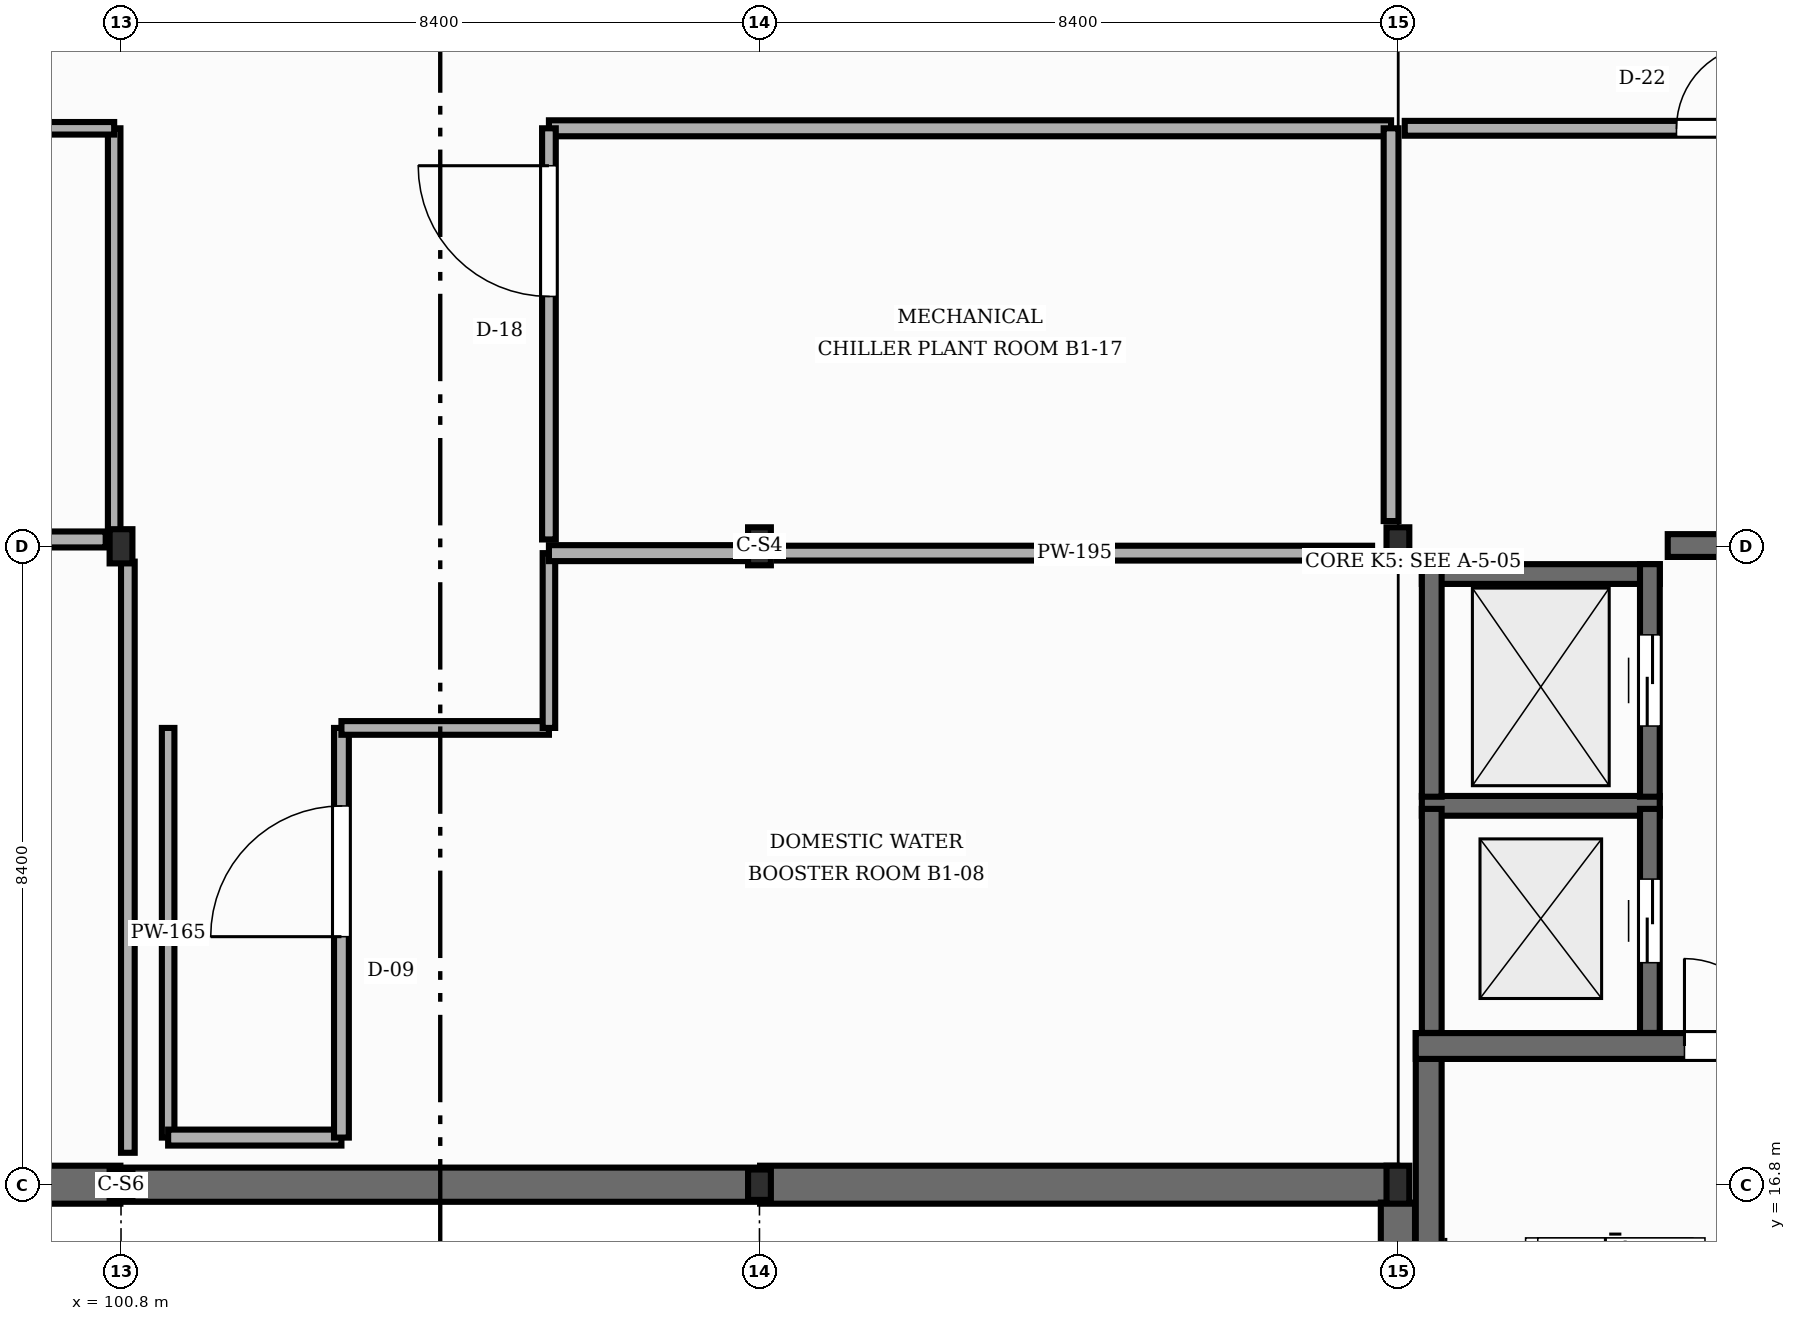
"""IFC4 building model, lengths in metres.
Left out: names, types, materials, properties, quantities, classifications, styles, units other than length and angle.
Written with IfcOpenShell. Run it as: python <this file> out.ifc"""

import sys

from ifc_helpers import new_model, si_unit, direction, frame, frame_2d, origin, origin_2d, place, context, subcontext, project, spatial, rectangle, i_section, extrude, element, fill, save


model = new_model("IFC4")
c1 = context("Model", 3, precision=1e-05, world=origin(), true_north=direction((0.0, 1.0)))
c2 = subcontext(c1, "Body", "Model", "MODEL_VIEW")
j1 = project(units=[si_unit("LENGTHUNIT", "METRE"), si_unit("PLANEANGLEUNIT", "RADIAN")], contexts=[c1])
p1 = place(None, origin())
s1 = spatial("IfcSite", under=j1, at=p1, CompositionType="ELEMENT")
p2 = place(p1, origin())
s2 = spatial("IfcBuilding", under=s1, at=p2, CompositionType="ELEMENT")
p3 = place(p2, frame((0.0, 0.0, -4.5)))
s3 = spatial("IfcBuildingStorey", under=s2, at=p3, CompositionType="ELEMENT", Elevation=-4.5)
p4 = place(p3, frame((100.8, 16.8, 0.0), z_axis=(0.0, 0.0, 1.0), x_axis=(1.0, 0.0, 0.0)))
e1 = element("IfcColumn", 1, at=p4, inside=s3, PredefinedType="COLUMN", context=c2, shape_type="SweptSolid", body=[
    extrude(i_section(OverallWidth=0.3, OverallDepth=0.4, WebThickness=0.013, FlangeThickness=0.024, FilletRadius=0.027, at=origin_2d()), origin(), (0.0, 0.0, 1.0), 4.5),
])
p5 = place(p3, frame((100.8, 25.2, 0.0), z_axis=(0.0, 0.0, 1.0), x_axis=(1.0, 0.0, 0.0)))
e2 = element("IfcColumn", 2, at=p5, inside=s3, PredefinedType="COLUMN", context=c2, shape_type="SweptSolid", body=[
    extrude(i_section(OverallWidth=0.3, OverallDepth=0.45, WebThickness=0.014, FlangeThickness=0.026, FilletRadius=0.027, at=origin_2d()), origin(), (0.0, 0.0, 1.0), 4.5),
])
p6 = place(p3, frame((109.2, 16.8, 0.0), z_axis=(0.0, 0.0, 1.0), x_axis=(1.0, 0.0, 0.0)))
e3 = element("IfcColumn", 3, at=p6, inside=s3, PredefinedType="COLUMN", context=c2, shape_type="SweptSolid", body=[
    extrude(i_section(OverallWidth=0.3, OverallDepth=0.4, WebThickness=0.013, FlangeThickness=0.024, FilletRadius=0.027, at=origin_2d()), origin(), (0.0, 0.0, 1.0), 4.5),
])
for number, where, z_axis, x_axis in (
    (4, (109.2, 25.2, 0.0), (0.0, 0.0, 1.0), (1.0, 0.0, 0.0)),
    (5, (117.6, 16.8, 0.0), (0.0, 0.0, 1.0), (1.0, 0.0, 0.0)),
    (6, (117.6, 25.2, 0.0), (0.0, 0.0, 1.0), (1.0, 0.0, 0.0)),
):
    element("IfcColumn", number, at=place(p3, frame(where, z_axis=z_axis, x_axis=x_axis)), inside=s3, PredefinedType="COLUMN", context=c2, shape_type="SweptSolid", body=[
        extrude(i_section(OverallWidth=0.3, OverallDepth=0.5, WebThickness=0.014, FlangeThickness=0.028, FilletRadius=0.027, at=origin_2d()), origin(), (0.0, 0.0, 1.0), 4.5),
    ])
p7 = place(p3, frame((92.408, 16.8, 0.0), z_axis=(0.0, 0.0, 1.0), x_axis=(1.0, 0.0, 0.0)))
e7 = element("IfcWall", 7, at=p7, inside=s3, PredefinedType="USERDEFINED", context=c2, shape_type="SweptSolid", body=[
    extrude(rectangle(XDim=8.384, YDim=0.5, at=frame_2d((4.192, 0.0))), origin(), (0.0, 0.0, 1.0), 4.25),
])
p8 = place(p3, frame((100.808, 16.8, 0.0), z_axis=(0.0, 0.0, 1.0), x_axis=(1.0, 0.0, 0.0)))
e8 = element("IfcWall", 8, at=p8, inside=s3, PredefinedType="USERDEFINED", context=c2, shape_type="SweptSolid", body=[
    extrude(rectangle(XDim=8.384, YDim=0.45, at=frame_2d((4.192, 0.0))), origin(), (0.0, 0.0, 1.0), 4.25),
])
p9 = place(p3, frame((109.208, 16.8, 0.0), z_axis=(0.0, 0.0, 1.0), x_axis=(1.0, 0.0, 0.0)))
e9 = element("IfcWall", 9, at=p9, inside=s3, PredefinedType="USERDEFINED", context=c2, shape_type="SweptSolid", body=[
    extrude(rectangle(XDim=8.384, YDim=0.5, at=frame_2d((4.192, 0.0))), origin(), (0.0, 0.0, 1.0), 4.25),
])
p10 = place(p3, frame((117.6, 16.565, 0.0), z_axis=(0.0, 0.0, 1.0), x_axis=(0.0, -1.0, 0.0)))
e10 = element("IfcWall", 10, at=p10, inside=s3, PredefinedType="USERDEFINED", context=c2, shape_type="SweptSolid", body=[
    extrude(rectangle(XDim=7.93, YDim=0.45, at=frame_2d((3.965, 0.0))), origin(), (0.0, 0.0, 1.0), 4.25),
])
p11 = place(p3, frame((118.005, 8.805, 0.0), z_axis=(0.0, 0.0, 1.0), x_axis=(0.0, 1.0, 0.0)))
e11 = element("IfcWall", 11, at=p11, inside=s3, PredefinedType="SHEAR", context=c2, shape_type="SweptSolid", body=[
    extrude(rectangle(XDim=9.99, YDim=0.34, at=frame_2d((4.995, 0.0))), origin(), (0.0, 0.0, 1.0), 4.25),
])
p12 = place(p3, frame((117.835, 18.625, 0.0), z_axis=(0.0, 0.0, 1.0), x_axis=(1.0, 0.0, 0.0)))
e12 = element("IfcWall", 12, at=p12, inside=s3, PredefinedType="SHEAR", context=c2, shape_type="SweptSolid", body=[
    extrude(rectangle(XDim=5.25, YDim=0.34, at=frame_2d((2.625, 0.0))), origin(), (0.0, 0.0, 1.0), 4.25),
])
p13 = place(p12, frame((3.535, 0.0, 0.0)))
e13 = element("IfcOpeningElement", 13, at=p13, cuts=e12, PredefinedType="OPENING", context=c2, shape_type="SweptSolid", body=[
    extrude(rectangle(XDim=1.15, YDim=2.15, at=frame_2d((0.575, 1.075))), frame((0.0, 0.18, 0.0), z_axis=(0.0, -1.0, 0.0), x_axis=(1.0, 0.0, 0.0)), (0.0, 0.0, 1.0), 0.36),
])
p14 = place(p3, frame((117.915, 21.785, 0.0), z_axis=(0.0, 0.0, 1.0), x_axis=(1.0, 0.0, 0.0)))
e14 = element("IfcWall", 14, at=p14, inside=s3, PredefinedType="SHEAR", context=c2, shape_type="SweptSolid", body=[
    extrude(rectangle(XDim=3.13, YDim=0.26, at=frame_2d((1.565, 0.0))), origin(), (0.0, 0.0, 1.0), 4.25),
])
p15 = place(p3, frame((118.045, 18.797, 0.0), z_axis=(0.0, 0.0, 1.0), x_axis=(0.0, 1.0, 0.0)))
e15 = element("IfcWall", 15, at=p15, inside=s3, PredefinedType="SHEAR", context=c2, shape_type="SweptSolid", body=[
    extrude(rectangle(XDim=2.948, YDim=0.26, at=frame_2d((1.474, 0.0))), origin(), (0.0, 0.0, 1.0), 4.25),
])
p16 = place(p3, frame((120.915, 18.797, 0.0), z_axis=(0.0, 0.0, 1.0), x_axis=(0.0, 1.0, 0.0)))
e16 = element("IfcWall", 16, at=p16, inside=s3, PredefinedType="SHEAR", context=c2, shape_type="SweptSolid", body=[
    extrude(rectangle(XDim=2.948, YDim=0.26, at=frame_2d((1.474, 0.0))), origin(), (0.0, 0.0, 1.0), 4.25),
])
p17 = place(p16, frame((0.924, 0.0, 0.0)))
e17 = element("IfcOpeningElement", 17, at=p17, cuts=e16, PredefinedType="OPENING", context=c2, shape_type="SweptSolid", body=[
    extrude(rectangle(XDim=1.1, YDim=2.15, at=frame_2d((0.55, 1.075))), frame((0.0, 0.14, 0.0), z_axis=(0.0, -1.0, 0.0), x_axis=(1.0, 0.0, 0.0)), (0.0, 0.0, 1.0), 0.28),
])
p18 = place(p3, frame((117.915, 24.835, 0.0), z_axis=(0.0, 0.0, 1.0), x_axis=(1.0, 0.0, 0.0)))
e18 = element("IfcWall", 18, at=p18, inside=s3, PredefinedType="SHEAR", context=c2, shape_type="SweptSolid", body=[
    extrude(rectangle(XDim=3.13, YDim=0.26, at=frame_2d((1.565, 0.0))), origin(), (0.0, 0.0, 1.0), 4.25),
])
p19 = place(p3, frame((118.045, 21.905, 0.0), z_axis=(0.0, 0.0, 1.0), x_axis=(0.0, 1.0, 0.0)))
e19 = element("IfcWall", 19, at=p19, inside=s3, PredefinedType="SHEAR", context=c2, shape_type="SweptSolid", body=[
    extrude(rectangle(XDim=3.06, YDim=0.26, at=frame_2d((1.53, 0.0))), origin(), (0.0, 0.0, 1.0), 4.25),
])
p20 = place(p3, frame((120.915, 21.905, 0.0), z_axis=(0.0, 0.0, 1.0), x_axis=(0.0, 1.0, 0.0)))
e20 = element("IfcWall", 20, at=p20, inside=s3, PredefinedType="SHEAR", context=c2, shape_type="SweptSolid", body=[
    extrude(rectangle(XDim=3.06, YDim=0.26, at=frame_2d((1.53, 0.0))), origin(), (0.0, 0.0, 1.0), 4.25),
])
p21 = place(p20, frame((0.93, 0.0, 0.0)))
e21 = element("IfcOpeningElement", 21, at=p21, cuts=e20, PredefinedType="OPENING", context=c2, shape_type="SweptSolid", body=[
    extrude(rectangle(XDim=1.2, YDim=2.15, at=frame_2d((0.6, 1.075))), frame((0.0, 0.14, 0.0), z_axis=(0.0, -1.0, 0.0), x_axis=(1.0, 0.0, 0.0)), (0.0, 0.0, 1.0), 0.28),
])
p22 = place(p3, frame((121.15, 25.21, 0.0), z_axis=(0.0, 0.0, 1.0), x_axis=(1.0, 0.0, 0.0)))
e22 = element("IfcWall", 22, at=p22, inside=s3, PredefinedType="SHEAR", context=c2, shape_type="SweptSolid", body=[
    extrude(rectangle(XDim=4.87, YDim=0.3, at=frame_2d((2.435, 0.0))), origin(), (0.0, 0.0, 1.0), 4.25),
])
p23 = place(p3, frame((101.42, 22.81, -0.004), z_axis=(0.0, 0.0, 1.0), x_axis=(0.0, -1.0, 0.0)))
e23 = element("IfcWall", 23, at=p23, inside=s3, PredefinedType="STANDARD", context=c2, shape_type="SweptSolid", body=[
    extrude(rectangle(XDim=5.39, YDim=0.165, at=frame_2d((2.695, 0.0))), origin(), (0.0, 0.0, 1.0), 4.254),
])
p24 = place(p3, frame((101.42, 17.42, -0.004), z_axis=(0.0, 0.0, 1.0), x_axis=(1.0, 0.0, 0.0)))
e24 = element("IfcWall", 24, at=p24, inside=s3, PredefinedType="STANDARD", context=c2, shape_type="SweptSolid", body=[
    extrude(rectangle(XDim=2.28, YDim=0.21, at=frame_2d((1.14, 0.0))), origin(), (0.0, 0.0, 1.0), 4.254),
])
p25 = place(p3, frame((103.7, 17.42, -0.004), z_axis=(0.0, 0.0, 1.0), x_axis=(0.0, 1.0, 0.0)))
e25 = element("IfcWall", 25, at=p25, inside=s3, PredefinedType="STANDARD", context=c2, shape_type="SweptSolid", body=[
    extrude(rectangle(XDim=5.39, YDim=0.195, at=frame_2d((2.695, 0.0))), origin(), (0.0, 0.0, 1.0), 4.016),
])
p26 = place(p25, frame((2.644, 0.0, 0.015)))
e26 = element("IfcOpeningElement", 26, at=p26, cuts=e25, PredefinedType="OPENING", context=c2, shape_type="SweptSolid", body=[
    extrude(rectangle(XDim=1.72, YDim=2.06, at=frame_2d((0.86, 1.03))), frame((0.0, 0.107, 0.0), z_axis=(0.0, -1.0, 0.0), x_axis=(1.0, 0.0, 0.0)), (0.0, 0.0, 1.0), 0.215),
])
p27 = place(p3, frame((103.7, 22.81, -0.004), z_axis=(0.0, 0.0, 1.0), x_axis=(1.0, 0.0, 0.0)))
e27 = element("IfcWall", 27, at=p27, inside=s3, PredefinedType="STANDARD", context=c2, shape_type="SweptSolid", body=[
    extrude(rectangle(XDim=2.73, YDim=0.18, at=frame_2d((1.365, 0.0))), origin(), (0.0, 0.0, 1.0), 4.254),
])
p28 = place(p3, frame((106.43, 22.81, -0.004), z_axis=(0.0, 0.0, 1.0), x_axis=(0.0, 1.0, 0.0)))
e28 = element("IfcWall", 28, at=p28, inside=s3, PredefinedType="STANDARD", context=c2, shape_type="SweptSolid", body=[
    extrude(rectangle(XDim=2.3, YDim=0.165, at=frame_2d((1.15, 0.0))), origin(), (0.0, 0.0, 1.0), 4.016),
])
p29 = place(p3, frame((106.43, 25.11, -0.004), z_axis=(0.0, 0.0, 1.0), x_axis=(1.0, 0.0, 0.0)))
e29 = element("IfcWall", 29, at=p29, inside=s3, PredefinedType="STANDARD", context=c2, shape_type="SweptSolid", body=[
    extrude(rectangle(XDim=2.541, YDim=0.21, at=frame_2d((1.271, 0.0))), origin(), (0.0, 0.0, 1.0), 3.736),
])
p30 = place(p3, frame((109.429, 25.11, -0.004), z_axis=(0.0, 0.0, 1.0), x_axis=(1.0, 0.0, 0.0)))
e30 = element("IfcWall", 30, at=p30, inside=s3, PredefinedType="STANDARD", context=c2, shape_type="SweptSolid", body=[
    extrude(rectangle(XDim=7.831, YDim=0.195, at=frame_2d((3.916, 0.0))), origin(), (0.0, 0.0, 1.0), 3.636),
])
p31 = place(p3, frame((100.89, 17.22, -0.004), z_axis=(0.0, 0.0, 1.0), x_axis=(0.0, 1.0, 0.0)))
e31 = element("IfcWall", 31, at=p31, inside=s3, PredefinedType="STANDARD", context=c2, shape_type="SweptSolid", body=[
    extrude(rectangle(XDim=7.778, YDim=0.18, at=frame_2d((3.889, 0.0))), origin(), (0.0, 0.0, 1.0), 3.636),
])
p32 = place(p3, frame((100.71, 30.7, -0.004), z_axis=(0.0, 0.0, 1.0), x_axis=(0.0, -1.0, 0.0)))
e32 = element("IfcWall", 32, at=p32, inside=s3, PredefinedType="STANDARD", context=c2, shape_type="SweptSolid", body=[
    extrude(rectangle(XDim=5.298, YDim=0.165, at=frame_2d((2.649, 0.0))), origin(), (0.0, 0.0, 1.0), 3.746),
])
p33 = place(p3, frame((100.598, 25.29, -0.004), z_axis=(0.0, 0.0, 1.0), x_axis=(-1.0, 0.0, 0.0)))
e33 = element("IfcWall", 33, at=p33, inside=s3, PredefinedType="STANDARD", context=c2, shape_type="SweptSolid", body=[
    extrude(rectangle(XDim=7.789, YDim=0.21, at=frame_2d((3.894, 0.0))), origin(), (0.0, 0.0, 1.0), 3.686),
])
p34 = place(p3, frame((84.09, 30.7, -0.004), z_axis=(0.0, 0.0, 1.0), x_axis=(1.0, 0.0, 0.0)))
e34 = element("IfcWall", 34, at=p34, inside=s3, PredefinedType="STANDARD", context=c2, shape_type="SweptSolid", body=[
    extrude(rectangle(XDim=16.62, YDim=0.165, at=frame_2d((8.31, 0.0))), origin(), (0.0, 0.0, 1.0), 4.254),
])
p35 = place(p34, frame((11.975, 0.0, 0.015)))
e35 = element("IfcOpeningElement", 35, at=p35, cuts=e34, PredefinedType="OPENING", context=c2, shape_type="SweptSolid", body=[
    extrude(rectangle(XDim=0.98, YDim=2.14, at=frame_2d((0.49, 1.07))), frame((0.0, 0.093, 0.0), z_axis=(0.0, -1.0, 0.0), x_axis=(1.0, 0.0, 0.0)), (0.0, 0.0, 1.0), 0.185),
])
p36 = place(p3, frame((106.43, 30.7, -0.004), z_axis=(0.0, 0.0, 1.0), x_axis=(1.0, 0.0, 0.0)))
e36 = element("IfcWall", 36, at=p36, inside=s3, PredefinedType="STANDARD", context=c2, shape_type="SweptSolid", body=[
    extrude(rectangle(XDim=11.08, YDim=0.21, at=frame_2d((5.54, 0.0))), origin(), (0.0, 0.0, 1.0), 4.254),
])
p37 = place(p3, frame((117.51, 30.7, -0.004), z_axis=(0.0, 0.0, 1.0), x_axis=(0.0, -1.0, 0.0)))
e37 = element("IfcWall", 37, at=p37, inside=s3, PredefinedType="STANDARD", context=c2, shape_type="SweptSolid", body=[
    extrude(rectangle(XDim=5.168, YDim=0.195, at=frame_2d((2.584, 0.0))), origin(), (0.0, 0.0, 1.0), 3.886),
])
p38 = place(p3, frame((106.43, 25.29, -0.004), z_axis=(0.0, 0.0, 1.0), x_axis=(0.0, 1.0, 0.0)))
e38 = element("IfcWall", 38, at=p38, inside=s3, PredefinedType="STANDARD", context=c2, shape_type="SweptSolid", body=[
    extrude(rectangle(XDim=5.41, YDim=0.18, at=frame_2d((2.705, 0.0))), origin(), (0.0, 0.0, 1.0), 3.936),
])
p39 = place(p38, frame((3.198, 0.0, 0.015)))
e39 = element("IfcOpeningElement", 39, at=p39, cuts=e38, PredefinedType="OPENING", context=c2, shape_type="SweptSolid", body=[
    extrude(rectangle(XDim=1.72, YDim=2.14, at=frame_2d((0.86, 1.07))), frame((0.0, 0.1, 0.0), z_axis=(0.0, -1.0, 0.0), x_axis=(1.0, 0.0, 0.0)), (0.0, 0.0, 1.0), 0.2),
])
p40 = place(p3, frame((117.69, 30.7, -0.004), z_axis=(0.0, 0.0, 1.0), x_axis=(1.0, 0.0, 0.0)))
e40 = element("IfcWall", 40, at=p40, inside=s3, PredefinedType="STANDARD", context=c2, shape_type="SweptSolid", body=[
    extrude(rectangle(XDim=8.25, YDim=0.195, at=frame_2d((4.125, 0.0))), origin(), (0.0, 0.0, 1.0), 4.254),
])
p41 = place(p40, frame((3.575, 0.0, 0.015)))
e41 = element("IfcOpeningElement", 41, at=p41, cuts=e40, PredefinedType="OPENING", context=c2, shape_type="SweptSolid", body=[
    extrude(rectangle(XDim=1.1, YDim=2.22, at=frame_2d((0.55, 1.11))), frame((0.0, 0.107, 0.0), z_axis=(0.0, -1.0, 0.0), x_axis=(1.0, 0.0, 0.0)), (0.0, 0.0, 1.0), 0.215),
])
p42 = place(p13, origin())
e42 = element("IfcDoor", 42, at=p42, inside=s3, OperationType="SINGLE_SWING_LEFT", PredefinedType="DOOR", context=c2, shape_type="SweptSolid", body=[
    extrude(rectangle(XDim=1.15, YDim=2.15, at=frame_2d((0.575, 1.075))), frame((0.0, 0.025, 0.0), z_axis=(0.0, -1.0, 0.0), x_axis=(1.0, 0.0, 0.0)), (0.0, 0.0, 1.0), 0.05),
])
fill(e13, e42)
p43 = place(p17, origin())
e43 = element("IfcDoor", 43, at=p43, inside=s3, OperationType="DOUBLE_DOOR_SLIDING", PredefinedType="DOOR", context=c2, shape_type="SweptSolid", body=[
    extrude(rectangle(XDim=1.1, YDim=2.15, at=frame_2d((0.55, 1.075))), frame((0.0, 0.025, 0.0), z_axis=(0.0, -1.0, 0.0), x_axis=(1.0, 0.0, 0.0)), (0.0, 0.0, 1.0), 0.05),
])
fill(e17, e43)
p44 = place(p21, origin())
e44 = element("IfcDoor", 44, at=p44, inside=s3, OperationType="DOUBLE_DOOR_SLIDING", PredefinedType="DOOR", context=c2, shape_type="SweptSolid", body=[
    extrude(rectangle(XDim=1.2, YDim=2.15, at=frame_2d((0.6, 1.075))), frame((0.0, 0.025, 0.0), z_axis=(0.0, -1.0, 0.0), x_axis=(1.0, 0.0, 0.0)), (0.0, 0.0, 1.0), 0.05),
])
fill(e21, e44)
p45 = place(p26, origin())
e45 = element("IfcDoor", 45, at=p45, inside=s3, OperationType="SINGLE_SWING_LEFT", PredefinedType="DOOR", context=c2, shape_type="SweptSolid", body=[
    extrude(rectangle(XDim=1.72, YDim=2.06, at=frame_2d((0.86, 1.03))), frame((0.0, 0.025, 0.0), z_axis=(0.0, -1.0, 0.0), x_axis=(1.0, 0.0, 0.0)), (0.0, 0.0, 1.0), 0.05),
])
fill(e26, e45)
p46 = place(p39, origin())
e46 = element("IfcDoor", 46, at=p46, inside=s3, OperationType="SINGLE_SWING_RIGHT", PredefinedType="DOOR", context=c2, shape_type="SweptSolid", body=[
    extrude(rectangle(XDim=1.72, YDim=2.14, at=frame_2d((0.86, 1.07))), frame((0.0, 0.025, 0.0), z_axis=(0.0, -1.0, 0.0), x_axis=(1.0, 0.0, 0.0)), (0.0, 0.0, 1.0), 0.05),
])
fill(e39, e46)
p47 = place(p41, origin())
e47 = element("IfcDoor", 47, at=p47, inside=s3, OperationType="SINGLE_SWING_RIGHT", PredefinedType="DOOR", context=c2, shape_type="SweptSolid", body=[
    extrude(rectangle(XDim=1.1, YDim=2.22, at=frame_2d((0.55, 1.11))), frame((0.0, 0.025, 0.0), z_axis=(0.0, -1.0, 0.0), x_axis=(1.0, 0.0, 0.0)), (0.0, 0.0, 1.0), 0.05),
])
fill(e41, e47)
save(model, sys.argv[1])
